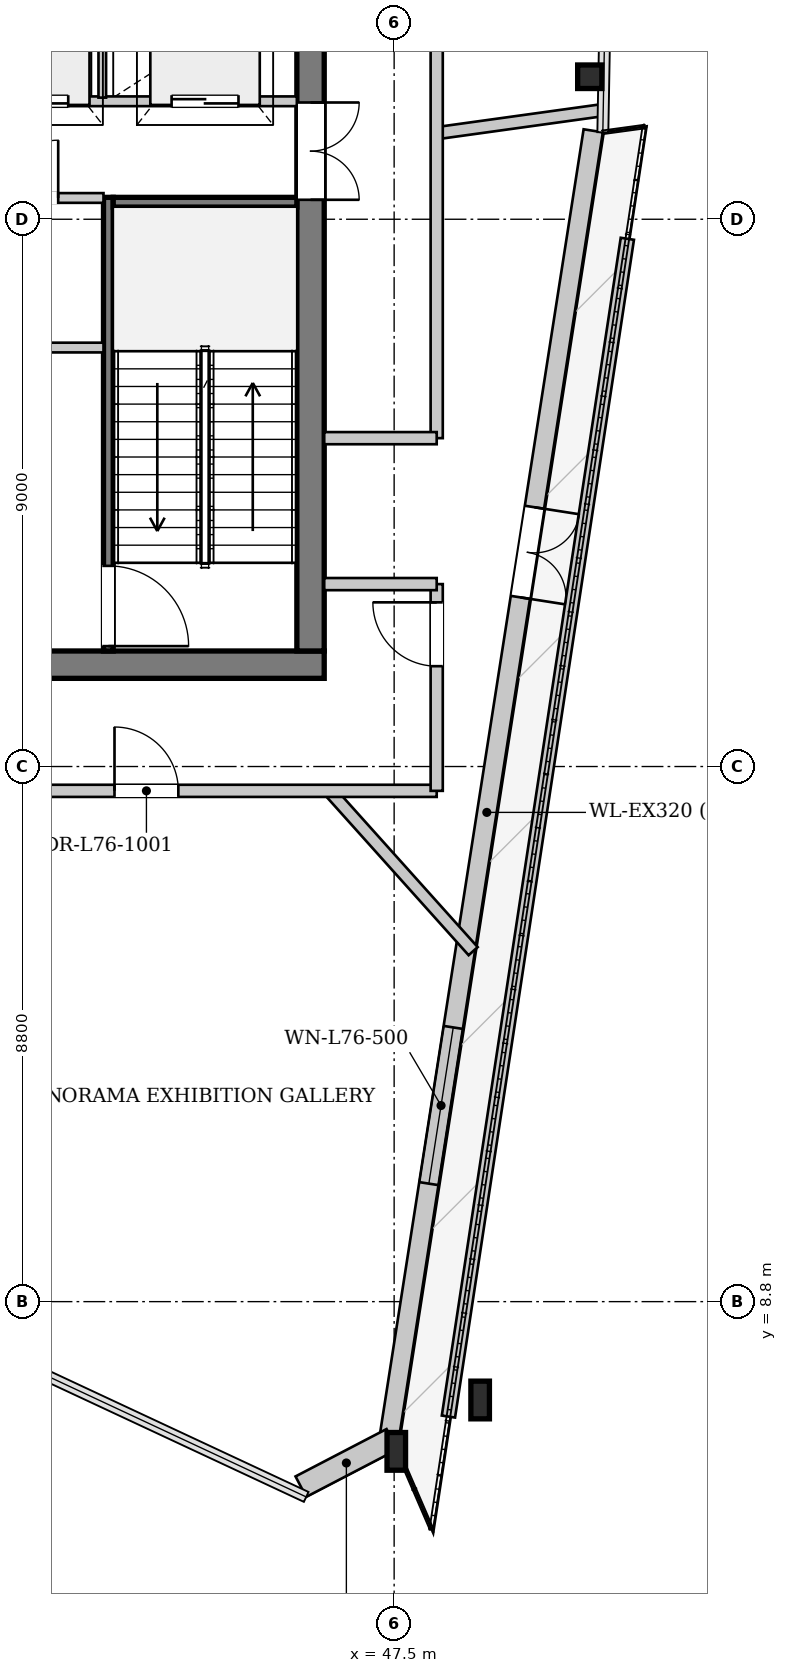
"""IFC4 building model, lengths in metres.
Left out: names, types, materials, properties, quantities, classifications, styles, units other than length and angle.
Written with IfcOpenShell. Run it as: python <this file> out.ifc"""

import sys

from ifc_helpers import new_model, si_unit, direction, frame, frame_2d, origin, origin_2d, place, context, subcontext, project, spatial, rectangle, i_section, extrude, source, transform, mapped, element, fill, save


model = new_model("IFC4")
c1 = context("Model", 3, precision=1e-05, world=origin(), true_north=direction((0.0, 1.0)))
c2 = subcontext(c1, "Body", "Model", "MODEL_VIEW")
j1 = project(units=[si_unit("LENGTHUNIT", "METRE"), si_unit("PLANEANGLEUNIT", "RADIAN")], contexts=[c1])
p1 = place(None, origin())
s1 = spatial("IfcSite", under=j1, at=p1, CompositionType="ELEMENT")
p2 = place(p1, origin())
s2 = spatial("IfcBuilding", under=s1, at=p2, CompositionType="ELEMENT")
p3 = place(p2, frame((0.0, 0.0, 286.1)))
s3 = spatial("IfcBuildingStorey", under=s2, at=p3, CompositionType="ELEMENT", Elevation=286.1)
m1 = source(origin(), c2, "Body", "SweptSolid", [
    extrude(i_section(OverallWidth=0.305, OverallDepth=0.62, WebThickness=0.021, FlangeThickness=0.04, at=origin_2d()), origin(), (0.0, 0.0, 1.0), 5.303),
])
p4 = place(p3, frame((46.054, 5.589, 0.0), z_axis=(0.558750446217, 0.282528754094, 0.779727799916), x_axis=(-0.451238365441, 0.892403461196, 0.0)))
e1 = element("IfcColumn", 1, at=p4, inside=s3, PredefinedType="COLUMN", context=c2, shape_type="MappedRepresentation", body=[
    mapped(m1, transform((0.0, 0.0, 0.0), x_axis=(1.0, 0.0, 0.0), y_axis=(0.0, 1.0, 0.0), z_axis=(0.0, 0.0, 1.0), scale=1.0)),
])
m2 = source(origin(), c2, "Body", "SweptSolid", [
    extrude(i_section(OverallWidth=0.305, OverallDepth=0.62, WebThickness=0.021, FlangeThickness=0.04, at=origin_2d()), origin(), (0.0, 0.0, 1.0), 5.215),
])
p5 = place(p3, frame((47.55, 6.368, 0.0), z_axis=(0.523187937414, 0.312433455109, 0.792880645667), x_axis=(-0.512709660243, 0.858562056169, 0.0)))
e2 = element("IfcColumn", 2, at=p5, inside=s3, PredefinedType="COLUMN", context=c2, shape_type="MappedRepresentation", body=[
    mapped(m2, transform((0.0, 0.0, 0.0), x_axis=(1.0, 0.0, 0.0), y_axis=(0.0, 1.0, 0.0), z_axis=(0.0, 0.0, 1.0), scale=1.0)),
])
m3 = source(origin(), c2, "Body", "SweptSolid", [
    extrude(i_section(OverallWidth=0.398, OverallDepth=0.387, WebThickness=0.019, FlangeThickness=0.029, at=origin_2d()), origin(), (0.0, 0.0, 1.0), 4.541),
])
p6 = place(p3, frame((50.932, 28.03, 0.0), z_axis=(-0.094735020085, 0.402220593223, 0.910628283306), x_axis=(-0.973365952515, -0.229256891904, 0.0)))
e3 = element("IfcColumn", 3, at=p6, inside=s3, PredefinedType="COLUMN", context=c2, shape_type="MappedRepresentation", body=[
    mapped(m3, transform((0.0, 0.0, 0.0), x_axis=(1.0, 0.0, 0.0), y_axis=(0.0, 1.0, 0.0), z_axis=(0.0, 0.0, 1.0), scale=1.0)),
])
p7 = place(p3, frame((50.774, 28.055, 0.0), z_axis=(0.0, 0.0, 1.0), x_axis=(-0.154256631158, -0.988030815179, 0.0)))
e4 = element("IfcWall", 4, at=p7, inside=s3, PredefinedType="SOLIDWALL", context=c2, shape_type="SweptSolid", body=[
    extrude(rectangle(XDim=21.925, YDim=0.32, at=frame_2d((10.962, 0.0))), origin(), (0.0, 0.0, 1.0), 3.662),
])
p8 = place(p7, frame((6.266, 0.0, 0.0)))
e5 = element("IfcOpeningElement", 5, at=p8, cuts=e4, PredefinedType="OPENING", context=c2, shape_type="SweptSolid", body=[
    extrude(rectangle(XDim=1.5, YDim=2.3, at=frame_2d((0.75, 1.15))), frame((0.0, 0.17, 0.0), z_axis=(0.0, -1.0, 0.0), x_axis=(1.0, 0.0, 0.0)), (0.0, 0.0, 1.0), 0.34),
])
p9 = place(p7, frame((14.924, 0.0, 0.65)))
e6 = element("IfcOpeningElement", 6, at=p9, cuts=e4, PredefinedType="OPENING", context=c2, shape_type="SweptSolid", body=[
    extrude(rectangle(XDim=2.6, YDim=2.35, at=frame_2d((1.3, 1.175))), frame((0.0, 0.17, 0.0), z_axis=(0.0, -1.0, 0.0), x_axis=(1.0, 0.0, 0.0)), (0.0, 0.0, 1.0), 0.34),
])
p10 = place(p3, frame((47.463, 6.536, 0.0), z_axis=(0.0, 0.0, 1.0), x_axis=(-0.887015338526, -0.46173995844, 0.0)))
e7 = element("IfcWall", 7, at=p10, inside=s3, PredefinedType="SOLIDWALL", context=c2, shape_type="SweptSolid", body=[
    extrude(rectangle(XDim=1.687, YDim=0.38, at=frame_2d((0.844, 0.0))), origin(), (0.0, 0.0, 1.0), 3.662),
])
p11 = place(p3, frame((48.393, 6.91, 0.0), z_axis=(0.0, 0.0, 1.0), x_axis=(0.150189659266, 0.98865720361, 0.0)))
e8 = element("IfcWall", 8, at=p11, inside=s3, PredefinedType="PARAPET", context=c2, shape_type="SweptSolid", body=[
    extrude(rectangle(XDim=19.591, YDim=0.22, at=frame_2d((9.795, 0.0))), origin(), (0.0, 0.0, 1.0), 0.3),
])
p12 = place(p3, frame((46.35, 19.275, 0.0), z_axis=(0.0, 0.0, 1.0), x_axis=(-1.0, 0.0, 0.0)))
e9 = element("IfcWall", 9, at=p12, inside=s3, PredefinedType="SHEAR", context=c2, shape_type="SweptSolid", body=[
    extrude(rectangle(XDim=16.7, YDim=0.45, at=frame_2d((8.35, 0.0))), origin(), (0.0, 0.0, 1.0), 4.12),
])
p13 = place(p12, frame((4.55, 0.0, 0.0)))
e10 = element("IfcOpeningElement", 10, at=p13, cuts=e9, PredefinedType="OPENING", context=c2, shape_type="SweptSolid", body=[
    extrude(rectangle(XDim=1.12, YDim=2.25, at=frame_2d((0.56, 1.125))), frame((0.0, 0.235, 0.0), z_axis=(0.0, -1.0, 0.0), x_axis=(1.0, 0.0, 0.0)), (0.0, 0.0, 1.0), 0.47),
])
p14 = place(p12, frame((11.05, 0.0, 0.0)))
e11 = element("IfcOpeningElement", 11, at=p14, cuts=e9, PredefinedType="OPENING", context=c2, shape_type="SweptSolid", body=[
    extrude(rectangle(XDim=1.12, YDim=2.25, at=frame_2d((0.56, 1.125))), frame((0.0, 0.235, 0.0), z_axis=(0.0, -1.0, 0.0), x_axis=(1.0, 0.0, 0.0)), (0.0, 0.0, 1.0), 0.47),
])
p15 = place(p3, frame((46.125, 33.7, 0.0), z_axis=(0.0, 0.0, 1.0), x_axis=(0.0, -1.0, 0.0)))
e12 = element("IfcWall", 12, at=p15, inside=s3, PredefinedType="SHEAR", context=c2, shape_type="SweptSolid", body=[
    extrude(rectangle(XDim=14.2, YDim=0.45, at=frame_2d((7.1, 0.0))), origin(), (0.0, 0.0, 1.0), 4.12),
])
p16 = place(p15, frame((5.18, 0.0, 0.0)))
e13 = element("IfcOpeningElement", 13, at=p16, cuts=e12, PredefinedType="OPENING", context=c2, shape_type="SweptSolid", body=[
    extrude(rectangle(XDim=1.6, YDim=2.2, at=frame_2d((0.8, 1.1))), frame((0.0, 0.235, 0.0), z_axis=(0.0, -1.0, 0.0), x_axis=(1.0, 0.0, 0.0)), (0.0, 0.0, 1.0), 0.47),
])
p17 = place(p15, frame((2.05, 0.0, 0.0)))
e14 = element("IfcOpeningElement", 14, at=p17, cuts=e12, PredefinedType="OPENING", context=c2, shape_type="SweptSolid", body=[
    extrude(rectangle(XDim=0.95, YDim=2.1, at=frame_2d((0.475, 1.05))), frame((0.0, 0.235, 0.0), z_axis=(0.0, -1.0, 0.0), x_axis=(1.0, 0.0, 0.0)), (0.0, 0.0, 1.0), 0.47),
])
p18 = place(p3, frame((42.8, 26.96, 0.0), z_axis=(0.0, 0.0, 1.0), x_axis=(0.0, -1.0, 0.0)))
e15 = element("IfcWall", 15, at=p18, inside=s3, PredefinedType="PARTITIONING", context=c2, shape_type="SweptSolid", body=[
    extrude(rectangle(XDim=7.46, YDim=0.16, at=frame_2d((3.73, 0.0))), origin(), (0.0, 0.0, 1.0), 4.12),
])
p19 = place(p18, frame((6.06, 0.0, 0.0)))
e16 = element("IfcOpeningElement", 16, at=p19, cuts=e15, PredefinedType="OPENING", context=c2, shape_type="SweptSolid", body=[
    extrude(rectangle(XDim=1.32, YDim=2.2, at=frame_2d((0.66, 1.1))), frame((0.0, 0.09, 0.0), z_axis=(0.0, -1.0, 0.0), x_axis=(1.0, 0.0, 0.0)), (0.0, 0.0, 1.0), 0.18),
])
p20 = place(p3, frame((42.88, 26.88, 0.0), z_axis=(0.0, 0.0, 1.0), x_axis=(1.0, 0.0, 0.0)))
e17 = element("IfcWall", 17, at=p20, inside=s3, PredefinedType="PARTITIONING", context=c2, shape_type="SweptSolid", body=[
    extrude(rectangle(XDim=3.02, YDim=0.16, at=frame_2d((1.51, 0.0))), origin(), (0.0, 0.0, 1.0), 4.12),
])
p21 = place(p3, frame((33.28, 24.49, 0.0), z_axis=(0.0, 0.0, 1.0), x_axis=(1.0, 0.0, 0.0)))
e18 = element("IfcWall", 18, at=p21, inside=s3, PredefinedType="PARTITIONING", context=c2, shape_type="SweptSolid", body=[
    extrude(rectangle(XDim=9.44, YDim=0.16, at=frame_2d((4.72, 0.0))), origin(), (0.0, 0.0, 1.0), 4.12),
])
p22 = place(p21, frame((0.85, 0.0, 0.95)))
e19 = element("IfcOpeningElement", 19, at=p22, cuts=e18, PredefinedType="OPENING", context=c2, shape_type="SweptSolid", body=[
    extrude(rectangle(XDim=1.4, YDim=1.8, at=frame_2d((0.7, 0.9))), frame((0.0, 0.09, 0.0), z_axis=(0.0, -1.0, 0.0), x_axis=(1.0, 0.0, 0.0)), (0.0, 0.0, 1.0), 0.18),
])
p23 = place(p3, frame((33.28, 26.95, 0.0), z_axis=(0.0, 0.0, 1.0), x_axis=(1.0, 0.0, 0.0)))
e20 = element("IfcWall", 20, at=p23, inside=s3, PredefinedType="PARTITIONING", context=c2, shape_type="SweptSolid", body=[
    extrude(rectangle(XDim=9.44, YDim=0.16, at=frame_2d((4.72, 0.0))), origin(), (0.0, 0.0, 1.0), 4.12),
])
p24 = place(p23, frame((1.2, 0.0, 0.0)))
e21 = element("IfcOpeningElement", 21, at=p24, cuts=e20, PredefinedType="OPENING", context=c2, shape_type="SweptSolid", body=[
    extrude(rectangle(XDim=0.95, YDim=2.1, at=frame_2d((0.475, 1.05))), frame((0.0, 0.09, 0.0), z_axis=(0.0, -1.0, 0.0), x_axis=(1.0, 0.0, 0.0)), (0.0, 0.0, 1.0), 0.18),
])
p25 = place(p23, frame((4.65, 0.0, 0.0)))
e22 = element("IfcOpeningElement", 22, at=p25, cuts=e20, PredefinedType="OPENING", context=c2, shape_type="SweptSolid", body=[
    extrude(rectangle(XDim=0.95, YDim=2.1, at=frame_2d((0.475, 1.05))), frame((0.0, 0.09, 0.0), z_axis=(0.0, -1.0, 0.0), x_axis=(1.0, 0.0, 0.0)), (0.0, 0.0, 1.0), 0.18),
])
p26 = place(p23, frame((7.745, 0.0, 0.0)))
e23 = element("IfcOpeningElement", 23, at=p26, cuts=e20, PredefinedType="OPENING", context=c2, shape_type="SweptSolid", body=[
    extrude(rectangle(XDim=0.95, YDim=2.1, at=frame_2d((0.475, 1.05))), frame((0.0, 0.09, 0.0), z_axis=(0.0, -1.0, 0.0), x_axis=(1.0, 0.0, 0.0)), (0.0, 0.0, 1.0), 0.18),
])
p27 = place(p3, frame((33.28, 28.54, 0.0), z_axis=(0.0, 0.0, 1.0), x_axis=(1.0, 0.0, 0.0)))
e24 = element("IfcWall", 24, at=p27, inside=s3, PredefinedType="PARTITIONING", context=c2, shape_type="SweptSolid", body=[
    extrude(rectangle(XDim=12.62, YDim=0.16, at=frame_2d((6.31, 0.0))), origin(), (0.0, 0.0, 1.0), 4.12),
])
p28 = place(p27, frame((0.8, 0.0, 0.0)))
e25 = element("IfcOpeningElement", 25, at=p28, cuts=e24, PredefinedType="OPENING", context=c2, shape_type="SweptSolid", body=[
    extrude(rectangle(XDim=0.95, YDim=2.1, at=frame_2d((0.475, 1.05))), frame((0.0, 0.09, 0.0), z_axis=(0.0, -1.0, 0.0), x_axis=(1.0, 0.0, 0.0)), (0.0, 0.0, 1.0), 0.18),
])
p29 = place(p27, frame((3.3, 0.0, 0.0)))
e26 = element("IfcOpeningElement", 26, at=p29, cuts=e24, PredefinedType="OPENING", context=c2, shape_type="SweptSolid", body=[
    extrude(rectangle(XDim=0.95, YDim=2.1, at=frame_2d((0.475, 1.05))), frame((0.0, 0.09, 0.0), z_axis=(0.0, -1.0, 0.0), x_axis=(1.0, 0.0, 0.0)), (0.0, 0.0, 1.0), 0.18),
])
p30 = place(p27, frame((5.63, 0.0, 0.0)))
e27 = element("IfcOpeningElement", 27, at=p30, cuts=e24, PredefinedType="OPENING", context=c2, shape_type="SweptSolid", body=[
    extrude(rectangle(XDim=1.1, YDim=2.2, at=frame_2d((0.55, 1.1))), frame((0.0, 0.09, 0.0), z_axis=(0.0, -1.0, 0.0), x_axis=(1.0, 0.0, 0.0)), (0.0, 0.0, 1.0), 0.18),
])
p31 = place(p27, frame((7.76, 0.0, 0.0)))
e28 = element("IfcOpeningElement", 28, at=p31, cuts=e24, PredefinedType="OPENING", context=c2, shape_type="SweptSolid", body=[
    extrude(rectangle(XDim=1.1, YDim=2.2, at=frame_2d((0.55, 1.1))), frame((0.0, 0.09, 0.0), z_axis=(0.0, -1.0, 0.0), x_axis=(1.0, 0.0, 0.0)), (0.0, 0.0, 1.0), 0.18),
])
p32 = place(p27, frame((10.56, 0.0, 0.0)))
e29 = element("IfcOpeningElement", 29, at=p32, cuts=e24, PredefinedType="OPENING", context=c2, shape_type="SweptSolid", body=[
    extrude(rectangle(XDim=1.1, YDim=2.2, at=frame_2d((0.55, 1.1))), frame((0.0, 0.09, 0.0), z_axis=(0.0, -1.0, 0.0), x_axis=(1.0, 0.0, 0.0)), (0.0, 0.0, 1.0), 0.18),
])
p33 = place(p3, frame((42.7, 28.6, 0.0), z_axis=(0.0, 0.0, 1.0), x_axis=(0.0, 1.0, 0.0)))
e30 = element("IfcWall", 30, at=p33, inside=s3, PredefinedType="PARTITIONING", context=c2, shape_type="SweptSolid", body=[
    extrude(rectangle(XDim=1.92, YDim=0.125, at=frame_2d((0.96, 0.0))), origin(), (0.0, 0.0, 1.0), 4.12),
])
p34 = place(p3, frame((46.434, 17.2, 0.0), z_axis=(0.0, 0.0, 1.0), x_axis=(0.667851981074, -0.744294116177, 0.0)))
e31 = element("IfcWall", 31, at=p34, inside=s3, PredefinedType="PARTITIONING", context=c2, shape_type="SweptSolid", body=[
    extrude(rectangle(XDim=3.542, YDim=0.2, at=frame_2d((1.771, 0.0))), origin(), (0.0, 0.0, 1.0), 4.12),
])
p35 = place(p3, frame((48.2, 28.015, 0.0), z_axis=(0.0, 0.0, 1.0), x_axis=(0.990516249749, 0.137395629415, 0.0)))
e32 = element("IfcWall", 32, at=p35, inside=s3, PredefinedType="PARTITIONING", context=c2, shape_type="SweptSolid", body=[
    extrude(rectangle(XDim=2.735, YDim=0.2, at=frame_2d((1.367, 0.0))), origin(), (0.0, 0.0, 1.0), 4.12),
])
p36 = place(p3, frame((27.8, 17.2, 0.0), z_axis=(0.0, 0.0, 1.0), x_axis=(1.0, 0.0, 0.0)))
e33 = element("IfcWall", 33, at=p36, inside=s3, PredefinedType="PARTITIONING", context=c2, shape_type="SweptSolid", body=[
    extrude(rectangle(XDim=20.4, YDim=0.2, at=frame_2d((10.2, 0.0))), origin(), (0.0, 0.0, 1.0), 3.865),
])
p37 = place(p36, frame((0.3, 0.0, 0.0)))
e34 = element("IfcOpeningElement", 34, at=p37, cuts=e33, PredefinedType="OPENING", context=c2, shape_type="SweptSolid", body=[
    extrude(rectangle(XDim=1.05, YDim=2.2, at=frame_2d((0.525, 1.1))), frame((0.0, 0.11, 0.0), z_axis=(0.0, -1.0, 0.0), x_axis=(1.0, 0.0, 0.0)), (0.0, 0.0, 1.0), 0.22),
])
p38 = place(p36, frame((15.101, 0.0, 0.0)))
e35 = element("IfcOpeningElement", 35, at=p38, cuts=e33, PredefinedType="OPENING", context=c2, shape_type="SweptSolid", body=[
    extrude(rectangle(XDim=1.05, YDim=2.2, at=frame_2d((0.525, 1.1))), frame((0.0, 0.11, 0.0), z_axis=(0.0, -1.0, 0.0), x_axis=(1.0, 0.0, 0.0)), (0.0, 0.0, 1.0), 0.22),
])
p39 = place(p3, frame((48.2, 17.2, 0.0), z_axis=(0.0, 0.0, 1.0), x_axis=(0.0, 1.0, 0.0)))
e36 = element("IfcWall", 36, at=p39, inside=s3, PredefinedType="PARTITIONING", context=c2, shape_type="SweptSolid", body=[
    extrude(rectangle(XDim=3.4, YDim=0.2, at=frame_2d((1.7, 0.0))), origin(), (0.0, 0.0, 1.0), 3.745),
])
p40 = place(p39, frame((2.05, 0.0, 0.0)))
e37 = element("IfcOpeningElement", 37, at=p40, cuts=e36, PredefinedType="OPENING", context=c2, shape_type="SweptSolid", body=[
    extrude(rectangle(XDim=1.05, YDim=2.2, at=frame_2d((0.525, 1.1))), frame((0.0, 0.11, 0.0), z_axis=(0.0, -1.0, 0.0), x_axis=(1.0, 0.0, 0.0)), (0.0, 0.0, 1.0), 0.22),
])
p41 = place(p3, frame((46.35, 20.6, 0.0), z_axis=(0.0, 0.0, 1.0), x_axis=(1.0, 0.0, 0.0)))
e38 = element("IfcWall", 38, at=p41, inside=s3, PredefinedType="PARTITIONING", context=c2, shape_type="SweptSolid", body=[
    extrude(rectangle(XDim=1.85, YDim=0.2, at=frame_2d((0.925, 0.0))), origin(), (0.0, 0.0, 1.0), 4.12),
])
p42 = place(p3, frame((48.2, 23.0, 0.0), z_axis=(0.0, 0.0, 1.0), x_axis=(0.0, 1.0, 0.0)))
e39 = element("IfcWall", 39, at=p42, inside=s3, PredefinedType="PARTITIONING", context=c2, shape_type="SweptSolid", body=[
    extrude(rectangle(XDim=13.0, YDim=0.2, at=frame_2d((6.5, 0.0))), origin(), (0.0, 0.0, 1.0), 3.745),
])
p43 = place(p3, frame((46.35, 23.0, 0.0), z_axis=(0.0, 0.0, 1.0), x_axis=(1.0, 0.0, 0.0)))
e40 = element("IfcWall", 40, at=p43, inside=s3, PredefinedType="PARTITIONING", context=c2, shape_type="SweptSolid", body=[
    extrude(rectangle(XDim=1.85, YDim=0.2, at=frame_2d((0.925, 0.0))), origin(), (0.0, 0.0, 1.0), 4.12),
])
m4 = source(origin(), c2, "Body", "SweptSolid", [
    extrude(rectangle(XDim=1.5, YDim=2.3, at=frame_2d((0.75, 1.15))), frame((0.0, 0.025, 0.0), z_axis=(0.0, -1.0, 0.0), x_axis=(1.0, 0.0, 0.0)), (0.0, 0.0, 1.0), 0.05),
])
p44 = place(p8, origin())
e41 = element("IfcDoor", 41, at=p44, inside=s3, OperationType="DOUBLE_DOOR_SINGLE_SWING", PredefinedType="DOOR", context=c2, shape_type="MappedRepresentation", body=[
    mapped(m4, transform((0.0, 0.0, 0.0), x_axis=(1.0, 0.0, 0.0), y_axis=(0.0, 1.0, 0.0), z_axis=(0.0, 0.0, 1.0), scale=1.0)),
])
fill(e5, e41)
m5 = source(origin(), c2, "Body", "SweptSolid", [
    extrude(rectangle(XDim=2.6, YDim=2.35, at=frame_2d((1.3, 1.175))), frame((0.0, 0.03, 0.0), z_axis=(0.0, -1.0, 0.0), x_axis=(1.0, 0.0, 0.0)), (0.0, 0.0, 1.0), 0.06),
])
p45 = place(p9, origin())
e42 = element("IfcWindow", 42, at=p45, inside=s3, PartitioningType="SINGLE_PANEL", PredefinedType="WINDOW", context=c2, shape_type="MappedRepresentation", body=[
    mapped(m5, transform((0.0, 0.0, 0.0), x_axis=(1.0, 0.0, 0.0), y_axis=(0.0, 1.0, 0.0), z_axis=(0.0, 0.0, 1.0), scale=1.0)),
])
fill(e6, e42)
m6 = source(origin(), c2, "Body", "SweptSolid", [
    extrude(rectangle(XDim=1.6, YDim=2.2, at=frame_2d((0.8, 1.1))), frame((0.0, 0.025, 0.0), z_axis=(0.0, -1.0, 0.0), x_axis=(1.0, 0.0, 0.0)), (0.0, 0.0, 1.0), 0.05),
])
p46 = place(p16, origin())
e43 = element("IfcDoor", 43, at=p46, inside=s3, OperationType="DOUBLE_DOOR_SINGLE_SWING", PredefinedType="DOOR", context=c2, shape_type="MappedRepresentation", body=[
    mapped(m6, transform((0.0, 0.0, 0.0), x_axis=(1.0, 0.0, 0.0), y_axis=(0.0, 1.0, 0.0), z_axis=(0.0, 0.0, 1.0), scale=1.0)),
])
fill(e13, e43)
m7 = source(origin(), c2, "Body", "SweptSolid", [
    extrude(rectangle(XDim=1.32, YDim=2.2, at=frame_2d((0.66, 1.1))), frame((0.0, 0.025, 0.0), z_axis=(0.0, -1.0, 0.0), x_axis=(1.0, 0.0, 0.0)), (0.0, 0.0, 1.0), 0.05),
])
p47 = place(p19, origin())
e44 = element("IfcDoor", 44, at=p47, inside=s3, OperationType="SINGLE_SWING_RIGHT", PredefinedType="DOOR", context=c2, shape_type="MappedRepresentation", body=[
    mapped(m7, transform((0.0, 0.0, 0.0), x_axis=(1.0, 0.0, 0.0), y_axis=(0.0, 1.0, 0.0), z_axis=(0.0, 0.0, 1.0), scale=1.0)),
])
fill(e16, e44)
m8 = source(origin(), c2, "Body", "SweptSolid", [
    extrude(rectangle(XDim=0.95, YDim=2.1, at=frame_2d((0.475, 1.05))), frame((0.0, 0.025, 0.0), z_axis=(0.0, -1.0, 0.0), x_axis=(1.0, 0.0, 0.0)), (0.0, 0.0, 1.0), 0.05),
])
p48 = place(p26, origin())
e45 = element("IfcDoor", 45, at=p48, inside=s3, OperationType="SINGLE_SWING_RIGHT", PredefinedType="DOOR", context=c2, shape_type="MappedRepresentation", body=[
    mapped(m8, transform((0.0, 0.0, 0.0), x_axis=(1.0, 0.0, 0.0), y_axis=(0.0, 1.0, 0.0), z_axis=(0.0, 0.0, 1.0), scale=1.0)),
])
fill(e23, e45)
m9 = source(origin(), c2, "Body", "SweptSolid", [
    extrude(rectangle(XDim=1.1, YDim=2.2, at=frame_2d((0.55, 1.1))), frame((0.0, 0.025, 0.0), z_axis=(0.0, -1.0, 0.0), x_axis=(1.0, 0.0, 0.0)), (0.0, 0.0, 1.0), 0.05),
])
p49 = place(p31, origin())
e46 = element("IfcDoor", 46, at=p49, inside=s3, OperationType="DOUBLE_DOOR_SLIDING", PredefinedType="DOOR", context=c2, shape_type="MappedRepresentation", body=[
    mapped(m9, transform((0.0, 0.0, 0.0), x_axis=(1.0, 0.0, 0.0), y_axis=(0.0, 1.0, 0.0), z_axis=(0.0, 0.0, 1.0), scale=1.0)),
])
fill(e28, e46)
p50 = place(p32, origin())
e47 = element("IfcDoor", 47, at=p50, inside=s3, OperationType="DOUBLE_DOOR_SLIDING", PredefinedType="DOOR", context=c2, shape_type="MappedRepresentation", body=[
    mapped(m9, transform((0.0, 0.0, 0.0), x_axis=(1.0, 0.0, 0.0), y_axis=(0.0, 1.0, 0.0), z_axis=(0.0, 0.0, 1.0), scale=1.0)),
])
fill(e29, e47)
m10 = source(origin(), c2, "Body", "SweptSolid", [
    extrude(rectangle(XDim=1.05, YDim=2.2, at=frame_2d((0.525, 1.1))), frame((0.0, 0.025, 0.0), z_axis=(0.0, -1.0, 0.0), x_axis=(1.0, 0.0, 0.0)), (0.0, 0.0, 1.0), 0.05),
])
p51 = place(p38, origin())
e48 = element("IfcDoor", 48, at=p51, inside=s3, OperationType="SINGLE_SWING_LEFT", PredefinedType="DOOR", context=c2, shape_type="MappedRepresentation", body=[
    mapped(m10, transform((0.0, 0.0, 0.0), x_axis=(1.0, 0.0, 0.0), y_axis=(0.0, 1.0, 0.0), z_axis=(0.0, 0.0, 1.0), scale=1.0)),
])
fill(e35, e48)
p52 = place(p40, origin())
e49 = element("IfcDoor", 49, at=p52, inside=s3, OperationType="SINGLE_SWING_RIGHT", PredefinedType="DOOR", context=c2, shape_type="MappedRepresentation", body=[
    mapped(m10, transform((0.0, 0.0, 0.0), x_axis=(1.0, 0.0, 0.0), y_axis=(0.0, 1.0, 0.0), z_axis=(0.0, 0.0, 1.0), scale=1.0)),
])
fill(e37, e49)
save(model, sys.argv[1])
